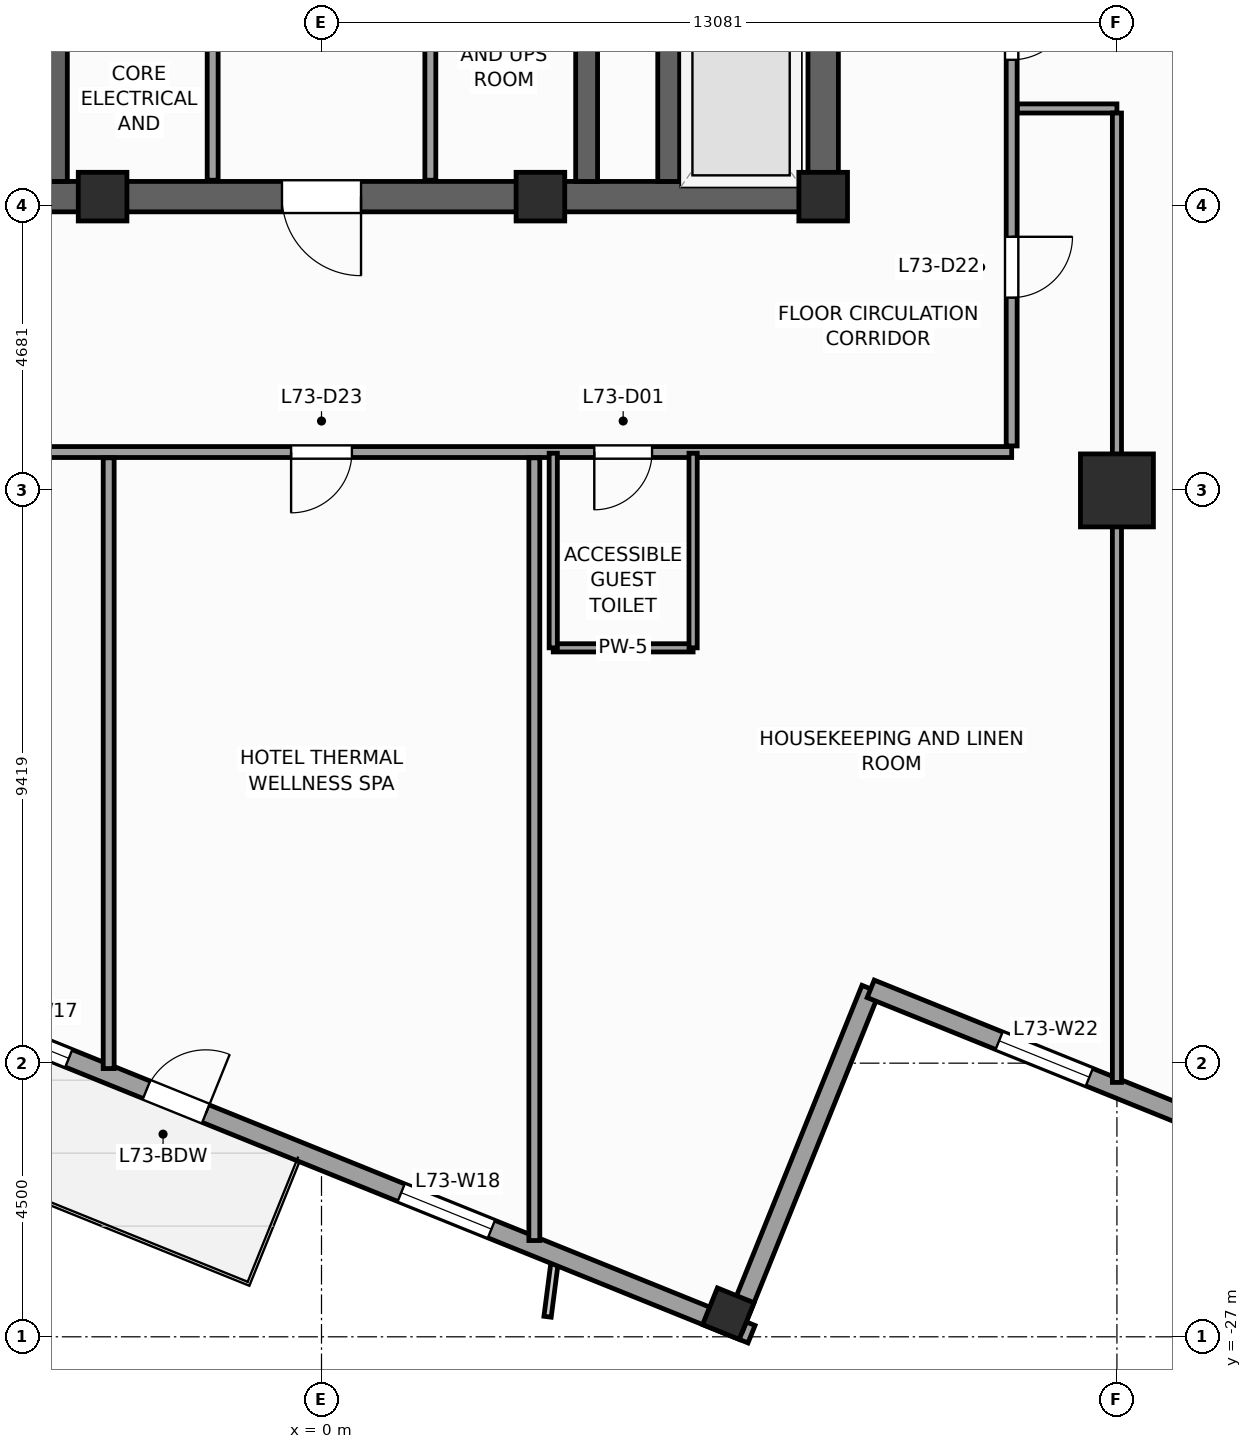
"""IFC4 building model, lengths in metres.
Left out: names, types, materials, properties, quantities, classifications, styles, units other than length and angle.
Written with IfcOpenShell. Run it as: python <this file> out.ifc"""

import sys

from ifc_helpers import new_model, si_unit, direction, frame, frame_2d, origin, origin_2d, place, context, subcontext, project, spatial, rectangle, extrude, source, transform, mapped, element, fill, save


model = new_model("IFC4")
c1 = context("Model", 3, precision=1e-05, world=origin(), true_north=direction((0.0, 1.0)))
c2 = subcontext(c1, "Body", "Model", "MODEL_VIEW")
j1 = project(units=[si_unit("LENGTHUNIT", "METRE"), si_unit("PLANEANGLEUNIT", "RADIAN")], contexts=[c1])
p1 = place(None, origin())
s1 = spatial("IfcSite", under=j1, at=p1, CompositionType="ELEMENT")
p2 = place(p1, origin())
s2 = spatial("IfcBuilding", under=s1, at=p2, CompositionType="ELEMENT")
p3 = place(p2, frame((0.0, 0.0, 297.6)))
s3 = spatial("IfcBuildingStorey", under=s2, at=p3, CompositionType="ELEMENT", Elevation=297.6)
p4 = place(p3, frame((-8.5, -8.25, 0.0), z_axis=(0.0, 0.0, 1.0), x_axis=(1.0, 0.0, 0.0)))
e1 = element("IfcWall", 1, at=p4, inside=s3, PredefinedType="SHEAR", context=c2, shape_type="SweptSolid", body=[
    extrude(rectangle(XDim=17.0, YDim=0.5, at=frame_2d((8.5, 0.0))), origin(), (0.0, 0.0, 1.0), 3.6),
])
p5 = place(p4, frame((7.85, 0.0, 0.0)))
e2 = element("IfcOpeningElement", 2, at=p5, cuts=e1, PredefinedType="OPENING", context=c2, shape_type="SweptSolid", body=[
    extrude(rectangle(XDim=1.3, YDim=2.2, at=frame_2d((0.65, 1.1))), frame((0.0, 0.26, 0.0), z_axis=(0.0, -1.0, 0.0), x_axis=(1.0, 0.0, 0.0)), (0.0, 0.0, 1.0), 0.52),
])
p6 = place(p3, frame((8.25, -8.0, 0.0), z_axis=(0.0, 0.0, 1.0), x_axis=(0.0, 1.0, 0.0)))
e3 = element("IfcWall", 3, at=p6, inside=s3, PredefinedType="SHEAR", context=c2, shape_type="SweptSolid", body=[
    extrude(rectangle(XDim=16.0, YDim=0.5, at=frame_2d((8.0, 0.0))), origin(), (0.0, 0.0, 1.0), 3.6),
])
p7 = place(p6, frame((4.69, 0.0, 0.0)))
e4 = element("IfcOpeningElement", 4, at=p7, cuts=e3, PredefinedType="OPENING", context=c2, shape_type="SweptSolid", body=[
    extrude(rectangle(XDim=1.3, YDim=2.2, at=frame_2d((0.65, 1.1))), frame((0.0, 0.26, 0.0), z_axis=(0.0, -1.0, 0.0), x_axis=(1.0, 0.0, 0.0)), (0.0, 0.0, 1.0), 0.52),
])
for number, where, z_axis, x_axis in (
    (5, (-4.36, -8.0, 0.0), (0.0, 0.0, 1.0), (0.0, 1.0, 0.0)),
    (6, (4.36, -8.0, 0.0), (0.0, 0.0, 1.0), (0.0, 1.0, 0.0)),
):
    element("IfcWall", number, at=place(p3, frame(where, z_axis=z_axis, x_axis=x_axis)), inside=s3, PredefinedType="SHEAR", context=c2, shape_type="SweptSolid", body=[
        extrude(rectangle(XDim=16.0, YDim=0.36, at=frame_2d((8.0, 0.0))), origin(), (0.0, 0.0, 1.0), 3.6),
    ])
p8 = place(p3, frame((5.71, -8.0, 0.0), z_axis=(0.0, 0.0, 1.0), x_axis=(0.0, 1.0, 0.0)))
e7 = element("IfcWall", 7, at=p8, inside=s3, PredefinedType="SHEAR", context=c2, shape_type="SweptSolid", body=[
    extrude(rectangle(XDim=2.54, YDim=0.36, at=frame_2d((1.27, 0.0))), origin(), (0.0, 0.0, 1.0), 3.6),
])
m1 = source(origin(), c2, "Body", "SweptSolid", [
    extrude(rectangle(XDim=0.8, YDim=0.8, at=origin_2d()), origin(), (0.0, 0.0, 1.0), 3.6),
])
for number, where, z_axis, x_axis in (
    (8, (8.25, -8.25, 0.0), (0.0, 0.0, 1.0), (1.0, 0.0, 0.0)),
    (9, (-3.6, -8.25, 0.0), (0.0, 0.0, 1.0), (1.0, 0.0, 0.0)),
    (10, (3.6, -8.25, 0.0), (0.0, 0.0, 1.0), (1.0, 0.0, 0.0)),
):
    element("IfcColumn", number, at=place(p3, frame(where, z_axis=z_axis, x_axis=x_axis)), inside=s3, PredefinedType="PILASTER", context=c2, shape_type="MappedRepresentation", body=[
        mapped(m1, transform((0.0, 0.0, 0.0), scale=1.0)),
    ])
m2 = source(origin(), c2, "Body", "SweptSolid", [
    extrude(rectangle(XDim=1.2, YDim=1.2, at=origin_2d()), origin(), (0.0, 0.0, 1.0), 3.6),
])
p9 = place(p3, frame((13.081, -13.081, 0.0), z_axis=(0.0, 0.0, 1.0), x_axis=(1.0, 0.0, 0.0)))
e11 = element("IfcColumn", 11, at=p9, inside=s3, PredefinedType="COLUMN", context=c2, shape_type="MappedRepresentation", body=[
    mapped(m2, transform((0.0, 0.0, 0.0), scale=1.0)),
])
m3 = source(origin(), c2, "Body", "SweptSolid", [
    extrude(rectangle(XDim=0.65, YDim=0.65, at=origin_2d()), origin(), (0.0, 0.0, 1.0), 3.6),
])
p10 = place(p3, frame((6.69, -26.62, 0.0), z_axis=(0.0, 0.0, 1.0), x_axis=(0.374606593416, 0.927183854567, 0.0)))
e12 = element("IfcColumn", 12, at=p10, inside=s3, PredefinedType="COLUMN", context=c2, shape_type="MappedRepresentation", body=[
    mapped(m3, transform((0.0, 0.0, 0.0), scale=1.0)),
])
p11 = place(p3, frame((-23.813, -14.479, 0.0), z_axis=(0.0, 0.0, 1.0), x_axis=(0.927182657188, -0.374609557019, 0.0)))
e13 = element("IfcWall", 13, at=p11, inside=s3, PredefinedType="STANDARD", context=c2, shape_type="SweptSolid", body=[
    extrude(rectangle(XDim=33.31, YDim=0.31, at=frame_2d((16.655, 0.0))), origin(), (0.0, 0.0, 1.0), 2.75),
])
p12 = place(p11, frame((22.58, 0.0, 0.0)))
e14 = element("IfcOpeningElement", 14, at=p12, cuts=e13, PredefinedType="OPENING", context=c2, shape_type="SweptSolid", body=[
    extrude(rectangle(XDim=1.05, YDim=2.25, at=frame_2d((0.525, 1.125))), frame((0.0, 0.165, 0.0), z_axis=(0.0, -1.0, 0.0), x_axis=(1.0, 0.0, 0.0)), (0.0, 0.0, 1.0), 0.33),
])
p13 = place(p11, frame((3.197, 0.0, 0.47)))
e15 = element("IfcOpeningElement", 15, at=p13, cuts=e13, PredefinedType="OPENING", context=c2, shape_type="SweptSolid", body=[
    extrude(rectangle(XDim=1.6, YDim=2.1, at=frame_2d((0.8, 1.05))), frame((0.0, 0.165, 0.0), z_axis=(0.0, -1.0, 0.0), x_axis=(1.0, 0.0, 0.0)), (0.0, 0.0, 1.0), 0.33),
])
p14 = place(p11, frame((8.86, 0.0, 0.47)))
e16 = element("IfcOpeningElement", 16, at=p14, cuts=e13, PredefinedType="OPENING", context=c2, shape_type="SweptSolid", body=[
    extrude(rectangle(XDim=1.6, YDim=2.1, at=frame_2d((0.8, 1.05))), frame((0.0, 0.165, 0.0), z_axis=(0.0, -1.0, 0.0), x_axis=(1.0, 0.0, 0.0)), (0.0, 0.0, 1.0), 0.33),
])
p15 = place(p11, frame((14.439, 0.0, 0.47)))
e17 = element("IfcOpeningElement", 17, at=p15, cuts=e13, PredefinedType="OPENING", context=c2, shape_type="SweptSolid", body=[
    extrude(rectangle(XDim=1.6, YDim=2.1, at=frame_2d((0.8, 1.05))), frame((0.0, 0.165, 0.0), z_axis=(0.0, -1.0, 0.0), x_axis=(1.0, 0.0, 0.0)), (0.0, 0.0, 1.0), 0.33),
])
p16 = place(p11, frame((19.601, 0.0, 0.47)))
e18 = element("IfcOpeningElement", 18, at=p16, cuts=e13, PredefinedType="OPENING", context=c2, shape_type="SweptSolid", body=[
    extrude(rectangle(XDim=1.6, YDim=2.1, at=frame_2d((0.8, 1.05))), frame((0.0, 0.165, 0.0), z_axis=(0.0, -1.0, 0.0), x_axis=(1.0, 0.0, 0.0)), (0.0, 0.0, 1.0), 0.33),
])
p17 = place(p11, frame((27.097, 0.0, 0.47)))
e19 = element("IfcOpeningElement", 19, at=p17, cuts=e13, PredefinedType="OPENING", context=c2, shape_type="SweptSolid", body=[
    extrude(rectangle(XDim=1.6, YDim=2.1, at=frame_2d((0.8, 1.05))), frame((0.0, 0.165, 0.0), z_axis=(0.0, -1.0, 0.0), x_axis=(1.0, 0.0, 0.0)), (0.0, 0.0, 1.0), 0.33),
])
p18 = place(p3, frame((6.784, -26.841, 0.0), z_axis=(0.0, 0.0, 1.0), x_axis=(0.374636620962, 0.927171722085, 0.0)))
e20 = element("IfcWall", 20, at=p18, inside=s3, PredefinedType="STANDARD", context=c2, shape_type="SweptSolid", body=[
    extrude(rectangle(XDim=6.0, YDim=0.31, at=frame_2d((3.0, 0.0))), origin(), (0.0, 0.0, 1.0), 2.65),
])
p19 = place(p3, frame((9.032, -21.278, 0.0), z_axis=(0.0, 0.0, 1.0), x_axis=(0.927185411764, -0.374602739196, 0.0)))
e21 = element("IfcWall", 21, at=p19, inside=s3, PredefinedType="STANDARD", context=c2, shape_type="SweptSolid", body=[
    extrude(rectangle(XDim=6.155, YDim=0.31, at=frame_2d((3.078, 0.0))), origin(), (0.0, 0.0, 1.0), 3.35),
])
p20 = place(p19, frame((2.278, 0.0, 0.47)))
e22 = element("IfcOpeningElement", 22, at=p20, cuts=e21, PredefinedType="OPENING", context=c2, shape_type="SweptSolid", body=[
    extrude(rectangle(XDim=1.6, YDim=2.1, at=frame_2d((0.8, 1.05))), frame((0.0, 0.165, 0.0), z_axis=(0.0, -1.0, 0.0), x_axis=(1.0, 0.0, 0.0)), (0.0, 0.0, 1.0), 0.33),
])
p21 = place(p3, frame((-1.79, -7.98, 0.0), z_axis=(0.0, 0.0, 1.0), x_axis=(0.0, 1.0, 0.0)))
e23 = element("IfcWall", 23, at=p21, inside=s3, PredefinedType="PARTITIONING", context=c2, shape_type="SweptSolid", body=[
    extrude(rectangle(XDim=12.38, YDim=0.18, at=frame_2d((6.19, 0.0))), origin(), (0.0, 0.0, 1.0), 3.35),
])
p22 = place(p21, frame((8.8, 0.0, 0.0)))
e24 = element("IfcOpeningElement", 24, at=p22, cuts=e23, PredefinedType="OPENING", context=c2, shape_type="SweptSolid", body=[
    extrude(rectangle(XDim=1.1, YDim=2.2, at=frame_2d((0.55, 1.1))), frame((0.0, 0.1, 0.0), z_axis=(0.0, -1.0, 0.0), x_axis=(1.0, 0.0, 0.0)), (0.0, 0.0, 1.0), 0.2),
])
p23 = place(p21, frame((10.86, 0.0, 0.0)))
e25 = element("IfcOpeningElement", 25, at=p23, cuts=e23, PredefinedType="OPENING", context=c2, shape_type="SweptSolid", body=[
    extrude(rectangle(XDim=1.1, YDim=2.2, at=frame_2d((0.55, 1.1))), frame((0.0, 0.1, 0.0), z_axis=(0.0, -1.0, 0.0), x_axis=(1.0, 0.0, 0.0)), (0.0, 0.0, 1.0), 0.2),
])
p24 = place(p21, frame((3.5, 0.0, 0.0)))
e26 = element("IfcOpeningElement", 26, at=p24, cuts=e23, PredefinedType="OPENING", context=c2, shape_type="SweptSolid", body=[
    extrude(rectangle(XDim=1.15, YDim=2.25, at=frame_2d((0.575, 1.125))), frame((0.0, 0.1, 0.0), z_axis=(0.0, -1.0, 0.0), x_axis=(1.0, 0.0, 0.0)), (0.0, 0.0, 1.0), 0.2),
])
p25 = place(p3, frame((1.79, -7.98, 0.0), z_axis=(0.0, 0.0, 1.0), x_axis=(0.0, 1.0, 0.0)))
e27 = element("IfcWall", 27, at=p25, inside=s3, PredefinedType="PARTITIONING", context=c2, shape_type="SweptSolid", body=[
    extrude(rectangle(XDim=12.38, YDim=0.18, at=frame_2d((6.19, 0.0))), origin(), (0.0, 0.0, 1.0), 3.35),
])
p26 = place(p25, frame((8.8, 0.0, 0.0)))
e28 = element("IfcOpeningElement", 28, at=p26, cuts=e27, PredefinedType="OPENING", context=c2, shape_type="SweptSolid", body=[
    extrude(rectangle(XDim=1.1, YDim=2.2, at=frame_2d((0.55, 1.1))), frame((0.0, 0.1, 0.0), z_axis=(0.0, -1.0, 0.0), x_axis=(1.0, 0.0, 0.0)), (0.0, 0.0, 1.0), 0.2),
])
p27 = place(p25, frame((10.86, 0.0, 0.0)))
e29 = element("IfcOpeningElement", 29, at=p27, cuts=e27, PredefinedType="OPENING", context=c2, shape_type="SweptSolid", body=[
    extrude(rectangle(XDim=1.1, YDim=2.2, at=frame_2d((0.55, 1.1))), frame((0.0, 0.1, 0.0), z_axis=(0.0, -1.0, 0.0), x_axis=(1.0, 0.0, 0.0)), (0.0, 0.0, 1.0), 0.2),
])
p28 = place(p25, frame((3.5, 0.0, 0.0)))
e30 = element("IfcOpeningElement", 30, at=p28, cuts=e27, PredefinedType="OPENING", context=c2, shape_type="SweptSolid", body=[
    extrude(rectangle(XDim=1.15, YDim=2.25, at=frame_2d((0.575, 1.125))), frame((0.0, 0.1, 0.0), z_axis=(0.0, -1.0, 0.0), x_axis=(1.0, 0.0, 0.0)), (0.0, 0.0, 1.0), 0.2),
])
p29 = place(p3, frame((-10.3, -12.45, 0.0), z_axis=(0.0, 0.0, 1.0), x_axis=(1.0, 0.0, 0.0)))
e31 = element("IfcWall", 31, at=p29, inside=s3, PredefinedType="PARTITIONING", context=c2, shape_type="SweptSolid", body=[
    extrude(rectangle(XDim=21.65, YDim=0.18, at=frame_2d((10.825, 0.0))), origin(), (0.0, 0.0, 1.0), 3.35),
])
p30 = place(p29, frame((14.786, 0.0, 0.0)))
e32 = element("IfcOpeningElement", 32, at=p30, cuts=e31, PredefinedType="OPENING", context=c2, shape_type="SweptSolid", body=[
    extrude(rectangle(XDim=0.95, YDim=2.1, at=frame_2d((0.475, 1.05))), frame((0.0, 0.1, 0.0), z_axis=(0.0, -1.0, 0.0), x_axis=(1.0, 0.0, 0.0)), (0.0, 0.0, 1.0), 0.2),
])
p31 = place(p29, frame((9.8, 0.0, 0.0)))
e33 = element("IfcOpeningElement", 33, at=p31, cuts=e31, PredefinedType="OPENING", context=c2, shape_type="SweptSolid", body=[
    extrude(rectangle(XDim=1.0, YDim=2.15, at=frame_2d((0.5, 1.075))), frame((0.0, 0.1, 0.0), z_axis=(0.0, -1.0, 0.0), x_axis=(1.0, 0.0, 0.0)), (0.0, 0.0, 1.0), 0.2),
])
p32 = place(p29, frame((3.064, 0.0, 0.0)))
e34 = element("IfcOpeningElement", 34, at=p32, cuts=e31, PredefinedType="OPENING", context=c2, shape_type="SweptSolid", body=[
    extrude(rectangle(XDim=1.0, YDim=2.15, at=frame_2d((0.5, 1.075))), frame((0.0, 0.1, 0.0), z_axis=(0.0, -1.0, 0.0), x_axis=(1.0, 0.0, 0.0)), (0.0, 0.0, 1.0), 0.2),
])
p33 = place(p3, frame((11.35, -12.35, 0.0), z_axis=(0.0, 0.0, 1.0), x_axis=(0.0, 1.0, 0.0)))
e35 = element("IfcWall", 35, at=p33, inside=s3, PredefinedType="PARTITIONING", context=c2, shape_type="SweptSolid", body=[
    extrude(rectangle(XDim=22.55, YDim=0.18, at=frame_2d((11.275, 0.0))), origin(), (0.0, 0.0, 1.0), 3.35),
])
p34 = place(p33, frame((17.15, 0.0, 0.0)))
e36 = element("IfcOpeningElement", 36, at=p34, cuts=e35, PredefinedType="OPENING", context=c2, shape_type="SweptSolid", body=[
    extrude(rectangle(XDim=1.0, YDim=2.15, at=frame_2d((0.5, 1.075))), frame((0.0, 0.1, 0.0), z_axis=(0.0, -1.0, 0.0), x_axis=(1.0, 0.0, 0.0)), (0.0, 0.0, 1.0), 0.2),
])
p35 = place(p33, frame((13.5, 0.0, 0.0)))
e37 = element("IfcOpeningElement", 37, at=p35, cuts=e35, PredefinedType="OPENING", context=c2, shape_type="SweptSolid", body=[
    extrude(rectangle(XDim=1.0, YDim=2.15, at=frame_2d((0.5, 1.075))), frame((0.0, 0.1, 0.0), z_axis=(0.0, -1.0, 0.0), x_axis=(1.0, 0.0, 0.0)), (0.0, 0.0, 1.0), 0.2),
])
p36 = place(p33, frame((9.5, 0.0, 0.0)))
e38 = element("IfcOpeningElement", 38, at=p36, cuts=e35, PredefinedType="OPENING", context=c2, shape_type="SweptSolid", body=[
    extrude(rectangle(XDim=1.0, YDim=2.15, at=frame_2d((0.5, 1.075))), frame((0.0, 0.1, 0.0), z_axis=(0.0, -1.0, 0.0), x_axis=(1.0, 0.0, 0.0)), (0.0, 0.0, 1.0), 0.2),
])
p37 = place(p33, frame((6.35, 0.0, 0.0)))
e39 = element("IfcOpeningElement", 39, at=p37, cuts=e35, PredefinedType="OPENING", context=c2, shape_type="SweptSolid", body=[
    extrude(rectangle(XDim=1.0, YDim=2.15, at=frame_2d((0.5, 1.075))), frame((0.0, 0.1, 0.0), z_axis=(0.0, -1.0, 0.0), x_axis=(1.0, 0.0, 0.0)), (0.0, 0.0, 1.0), 0.2),
])
p38 = place(p33, frame((2.439, 0.0, 0.0)))
e40 = element("IfcOpeningElement", 40, at=p38, cuts=e35, PredefinedType="OPENING", context=c2, shape_type="SweptSolid", body=[
    extrude(rectangle(XDim=1.0, YDim=2.15, at=frame_2d((0.5, 1.075))), frame((0.0, 0.1, 0.0), z_axis=(0.0, -1.0, 0.0), x_axis=(1.0, 0.0, 0.0)), (0.0, 0.0, 1.0), 0.2),
])
p39 = place(p3, frame((3.5, -12.545, 0.0), z_axis=(0.0, 0.0, 1.0), x_axis=(0.0, -1.0, 0.0)))
e41 = element("IfcWall", 41, at=p39, inside=s3, PredefinedType="PARTITIONING", context=c2, shape_type="SweptSolid", body=[
    extrude(rectangle(XDim=12.872, YDim=0.18, at=frame_2d((6.436, 0.0))), origin(), (0.0, 0.0, 1.0), 3.35),
])
p40 = place(p3, frame((-3.5, -12.545, 0.0), z_axis=(0.0, 0.0, 1.0), x_axis=(0.0, -1.0, 0.0)))
e42 = element("IfcWall", 42, at=p40, inside=s3, PredefinedType="PARTITIONING", context=c2, shape_type="SweptSolid", body=[
    extrude(rectangle(XDim=10.044, YDim=0.18, at=frame_2d((5.022, 0.0))), origin(), (0.0, 0.0, 1.0), 3.35),
])
p41 = place(p3, frame((11.445, -6.8, 0.0), z_axis=(0.0, 0.0, 1.0), x_axis=(1.0, 0.0, 0.0)))
e43 = element("IfcWall", 43, at=p41, inside=s3, PredefinedType="PARTITIONING", context=c2, shape_type="SweptSolid", body=[
    extrude(rectangle(XDim=1.636, YDim=0.15, at=frame_2d((0.818, 0.0))), origin(), (0.0, 0.0, 1.0), 3.35),
])
p42 = place(p3, frame((13.081, -6.875, 0.0), z_axis=(0.0, 0.0, 1.0), x_axis=(0.0, -1.0, 0.0)))
e44 = element("IfcWall", 44, at=p42, inside=s3, PredefinedType="PARTITIONING", context=c2, shape_type="SweptSolid", body=[
    extrude(rectangle(XDim=15.942, YDim=0.15, at=frame_2d((7.971, 0.0))), origin(), (0.0, 0.0, 1.0), 2.45),
])
p43 = place(p3, frame((3.811, -15.67, 0.0), z_axis=(0.0, 0.0, 1.0), x_axis=(1.0, 0.0, 0.0)))
e45 = element("IfcWall", 45, at=p43, inside=s3, PredefinedType="PARTITIONING", context=c2, shape_type="SweptSolid", body=[
    extrude(rectangle(XDim=2.3, YDim=0.135, at=frame_2d((1.15, 0.0))), origin(), (0.0, 0.0, 1.0), 3.35),
])
for number, where, z_axis, x_axis in (
    (46, (6.111, -15.67, 0.0), (0.0, 0.0, 1.0), (0.0, 1.0, 0.0)),
    (47, (3.811, -15.67, 0.0), (0.0, 0.0, 1.0), (0.0, 1.0, 0.0)),
):
    element("IfcWall", number, at=place(p3, frame(where, z_axis=z_axis, x_axis=x_axis)), inside=s3, PredefinedType="PARTITIONING", context=c2, shape_type="SweptSolid", body=[
        extrude(rectangle(XDim=3.2, YDim=0.135, at=frame_2d((1.6, 0.0))), origin(), (0.0, 0.0, 1.0), 3.35),
    ])
m4 = source(origin(), c2, "Body", "SweptSolid", [
    extrude(rectangle(XDim=1.05, YDim=2.25, at=frame_2d((0.525, 1.125))), frame((0.0, 0.025, 0.0), z_axis=(0.0, -1.0, 0.0), x_axis=(1.0, 0.0, 0.0)), (0.0, 0.0, 1.0), 0.05),
])
p44 = place(p12, origin())
e48 = element("IfcDoor", 48, at=p44, inside=s3, OperationType="SINGLE_SWING_RIGHT", PredefinedType="DOOR", context=c2, shape_type="MappedRepresentation", body=[
    mapped(m4, transform((0.0, 0.0, 0.0), scale=1.0)),
])
fill(e14, e48)
m5 = source(origin(), c2, "Body", "SweptSolid", [
    extrude(rectangle(XDim=1.6, YDim=2.1, at=frame_2d((0.8, 1.05))), frame((0.0, 0.03, 0.0), z_axis=(0.0, -1.0, 0.0), x_axis=(1.0, 0.0, 0.0)), (0.0, 0.0, 1.0), 0.06),
])
p45 = place(p16, origin())
e49 = element("IfcWindow", 49, at=p45, inside=s3, PartitioningType="SINGLE_PANEL", PredefinedType="WINDOW", context=c2, shape_type="MappedRepresentation", body=[
    mapped(m5, transform((0.0, 0.0, 0.0), scale=1.0)),
])
fill(e18, e49)
p46 = place(p17, origin())
e50 = element("IfcWindow", 50, at=p46, inside=s3, PartitioningType="SINGLE_PANEL", PredefinedType="WINDOW", context=c2, shape_type="MappedRepresentation", body=[
    mapped(m5, transform((0.0, 0.0, 0.0), scale=1.0)),
])
fill(e19, e50)
p47 = place(p20, origin())
e51 = element("IfcWindow", 51, at=p47, inside=s3, PartitioningType="SINGLE_PANEL", PredefinedType="WINDOW", context=c2, shape_type="MappedRepresentation", body=[
    mapped(m5, transform((0.0, 0.0, 0.0), scale=1.0)),
])
fill(e22, e51)
m6 = source(origin(), c2, "Body", "SweptSolid", [
    extrude(rectangle(XDim=1.3, YDim=2.2, at=frame_2d((0.65, 1.1))), frame((0.0, 0.025, 0.0), z_axis=(0.0, -1.0, 0.0), x_axis=(1.0, 0.0, 0.0)), (0.0, 0.0, 1.0), 0.05),
])
p48 = place(p5, frame((1.3, 0.0, 0.0), z_axis=(0.0, 0.0, 1.0), x_axis=(-1.0, 0.0, 0.0)))
e52 = element("IfcDoor", 52, at=p48, inside=s3, OperationType="SINGLE_SWING_RIGHT", PredefinedType="DOOR", context=c2, shape_type="MappedRepresentation", body=[
    mapped(m6, transform((0.0, 0.0, 0.0), scale=1.0)),
])
fill(e2, e52)
m7 = source(origin(), c2, "Body", "SweptSolid", [
    extrude(rectangle(XDim=0.95, YDim=2.1, at=frame_2d((0.475, 1.05))), frame((0.0, 0.025, 0.0), z_axis=(0.0, -1.0, 0.0), x_axis=(1.0, 0.0, 0.0)), (0.0, 0.0, 1.0), 0.05),
])
p49 = place(p30, frame((0.95, 0.0, 0.0), z_axis=(0.0, 0.0, 1.0), x_axis=(-1.0, 0.0, 0.0)))
e53 = element("IfcDoor", 53, at=p49, inside=s3, OperationType="SINGLE_SWING_LEFT", PredefinedType="DOOR", context=c2, shape_type="MappedRepresentation", body=[
    mapped(m7, transform((0.0, 0.0, 0.0), scale=1.0)),
])
fill(e32, e53)
m8 = source(origin(), c2, "Body", "SweptSolid", [
    extrude(rectangle(XDim=1.0, YDim=2.15, at=frame_2d((0.5, 1.075))), frame((0.0, 0.025, 0.0), z_axis=(0.0, -1.0, 0.0), x_axis=(1.0, 0.0, 0.0)), (0.0, 0.0, 1.0), 0.05),
])
p50 = place(p37, frame((1.0, 0.0, 0.0), z_axis=(0.0, 0.0, 1.0), x_axis=(-1.0, 0.0, 0.0)))
e54 = element("IfcDoor", 54, at=p50, inside=s3, OperationType="SINGLE_SWING_RIGHT", PredefinedType="DOOR", context=c2, shape_type="MappedRepresentation", body=[
    mapped(m8, transform((0.0, 0.0, 0.0), scale=1.0)),
])
fill(e39, e54)
p51 = place(p38, frame((1.0, 0.0, 0.0), z_axis=(0.0, 0.0, 1.0), x_axis=(-1.0, 0.0, 0.0)))
e55 = element("IfcDoor", 55, at=p51, inside=s3, OperationType="SINGLE_SWING_RIGHT", PredefinedType="DOOR", context=c2, shape_type="MappedRepresentation", body=[
    mapped(m8, transform((0.0, 0.0, 0.0), scale=1.0)),
])
fill(e40, e55)
p52 = place(p31, frame((1.0, 0.0, 0.0), z_axis=(0.0, 0.0, 1.0), x_axis=(-1.0, 0.0, 0.0)))
e56 = element("IfcDoor", 56, at=p52, inside=s3, OperationType="SINGLE_SWING_LEFT", PredefinedType="DOOR", context=c2, shape_type="MappedRepresentation", body=[
    mapped(m8, transform((0.0, 0.0, 0.0), scale=1.0)),
])
fill(e33, e56)
save(model, sys.argv[1])
